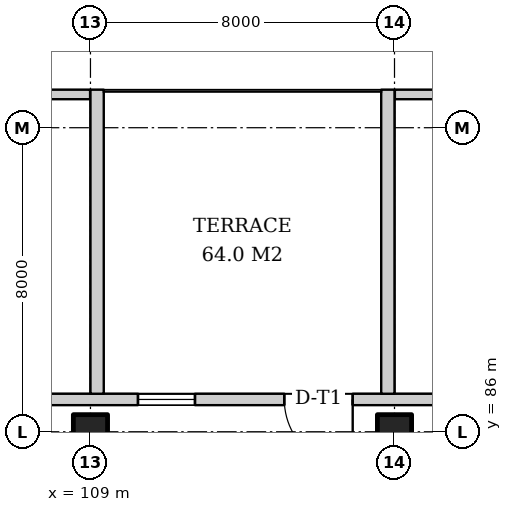
"""IFC4 building model, lengths in metres.
Left out: names, types, materials, properties, quantities, classifications, styles, units other than length and angle.
Written with IfcOpenShell. Run it as: python <this file> out.ifc"""

import sys

from ifc_helpers import new_model, si_unit, direction, frame, frame_2d, origin, origin_2d, place, context, subcontext, project, spatial, rectangle, extrude, element, fill, save


model = new_model("IFC4")
c1 = context("Model", 3, precision=1e-05, world=origin(), true_north=direction((0.0, 1.0)))
c2 = subcontext(c1, "Body", "Model", "MODEL_VIEW")
j1 = project(units=[si_unit("LENGTHUNIT", "METRE"), si_unit("PLANEANGLEUNIT", "RADIAN")], contexts=[c1])
p1 = place(None, origin())
s1 = spatial("IfcSite", under=j1, at=p1, CompositionType="ELEMENT")
p2 = place(p1, origin())
s2 = spatial("IfcBuilding", under=s1, at=p2, CompositionType="ELEMENT")
p3 = place(p2, frame((0.0, 0.0, 6.0)))
s3 = spatial("IfcBuildingStorey", under=s2, at=p3, CompositionType="ELEMENT", Elevation=6.0)
for number, where, z_axis, x_axis in (
    (1, (109.0, 86.0, 0.0), (0.0, 0.0, 1.0), (1.0, 0.0, 0.0)),
    (2, (117.0, 86.0, 0.0), (0.0, 0.0, 1.0), (1.0, 0.0, 0.0)),
):
    element("IfcColumn", number, at=place(p3, frame(where, z_axis=z_axis, x_axis=x_axis)), inside=s3, PredefinedType="COLUMN", context=c2, shape_type="SweptSolid", body=[
        extrude(rectangle(XDim=0.9, YDim=0.9, at=origin_2d()), origin(), (0.0, 0.0, 1.0), 5.0),
    ])
p4 = place(p3, frame((142.0, 86.85, 0.0), z_axis=(0.0, 0.0, 1.0), x_axis=(-1.0, 0.0, 0.0)))
e3 = element("IfcWall", 3, at=p4, inside=s3, PredefinedType="SOLIDWALL", context=c2, shape_type="SweptSolid", body=[
    extrude(rectangle(XDim=50.0, YDim=0.3, at=frame_2d((25.0, 0.0))), origin(), (0.0, 0.0, 1.0), 4.7),
])
p5 = place(p4, frame((1.5, 0.0, 0.9)))
e4 = element("IfcOpeningElement", 4, at=p5, cuts=e3, PredefinedType="OPENING", context=c2, shape_type="SweptSolid", body=[
    extrude(rectangle(XDim=1.5, YDim=3.2, at=frame_2d((0.75, 1.6))), frame((0.0, 0.16, 0.0), z_axis=(0.0, -1.0, 0.0), x_axis=(1.0, 0.0, 0.0)), (0.0, 0.0, 1.0), 0.32),
])
p6 = place(p4, frame((6.0, 0.0, 0.9)))
e5 = element("IfcOpeningElement", 5, at=p6, cuts=e3, PredefinedType="OPENING", context=c2, shape_type="SweptSolid", body=[
    extrude(rectangle(XDim=1.5, YDim=3.2, at=frame_2d((0.75, 1.6))), frame((0.0, 0.16, 0.0), z_axis=(0.0, -1.0, 0.0), x_axis=(1.0, 0.0, 0.0)), (0.0, 0.0, 1.0), 0.32),
])
p7 = place(p4, frame((10.25, 0.0, 0.9)))
e6 = element("IfcOpeningElement", 6, at=p7, cuts=e3, PredefinedType="OPENING", context=c2, shape_type="SweptSolid", body=[
    extrude(rectangle(XDim=1.5, YDim=3.2, at=frame_2d((0.75, 1.6))), frame((0.0, 0.16, 0.0), z_axis=(0.0, -1.0, 0.0), x_axis=(1.0, 0.0, 0.0)), (0.0, 0.0, 1.0), 0.32),
])
p8 = place(p4, frame((14.25, 0.0, 0.9)))
e7 = element("IfcOpeningElement", 7, at=p8, cuts=e3, PredefinedType="OPENING", context=c2, shape_type="SweptSolid", body=[
    extrude(rectangle(XDim=1.5, YDim=3.2, at=frame_2d((0.75, 1.6))), frame((0.0, 0.16, 0.0), z_axis=(0.0, -1.0, 0.0), x_axis=(1.0, 0.0, 0.0)), (0.0, 0.0, 1.0), 0.32),
])
p9 = place(p4, frame((18.25, 0.0, 0.9)))
e8 = element("IfcOpeningElement", 8, at=p9, cuts=e3, PredefinedType="OPENING", context=c2, shape_type="SweptSolid", body=[
    extrude(rectangle(XDim=1.5, YDim=3.2, at=frame_2d((0.75, 1.6))), frame((0.0, 0.16, 0.0), z_axis=(0.0, -1.0, 0.0), x_axis=(1.0, 0.0, 0.0)), (0.0, 0.0, 1.0), 0.32),
])
p10 = place(p4, frame((22.25, 0.0, 0.9)))
e9 = element("IfcOpeningElement", 9, at=p10, cuts=e3, PredefinedType="OPENING", context=c2, shape_type="SweptSolid", body=[
    extrude(rectangle(XDim=1.5, YDim=3.2, at=frame_2d((0.75, 1.6))), frame((0.0, 0.16, 0.0), z_axis=(0.0, -1.0, 0.0), x_axis=(1.0, 0.0, 0.0)), (0.0, 0.0, 1.0), 0.32),
])
p11 = place(p4, frame((26.1, 0.0, 0.0)))
e10 = element("IfcOpeningElement", 10, at=p11, cuts=e3, PredefinedType="OPENING", context=c2, shape_type="SweptSolid", body=[
    extrude(rectangle(XDim=1.8, YDim=2.4, at=frame_2d((0.9, 1.2))), frame((0.0, 0.16, 0.0), z_axis=(0.0, -1.0, 0.0), x_axis=(1.0, 0.0, 0.0)), (0.0, 0.0, 1.0), 0.32),
])
p12 = place(p4, frame((30.25, 0.0, 0.9)))
e11 = element("IfcOpeningElement", 11, at=p12, cuts=e3, PredefinedType="OPENING", context=c2, shape_type="SweptSolid", body=[
    extrude(rectangle(XDim=1.5, YDim=3.2, at=frame_2d((0.75, 1.6))), frame((0.0, 0.16, 0.0), z_axis=(0.0, -1.0, 0.0), x_axis=(1.0, 0.0, 0.0)), (0.0, 0.0, 1.0), 0.32),
])
p13 = place(p4, frame((34.25, 0.0, 0.9)))
e12 = element("IfcOpeningElement", 12, at=p13, cuts=e3, PredefinedType="OPENING", context=c2, shape_type="SweptSolid", body=[
    extrude(rectangle(XDim=1.5, YDim=3.2, at=frame_2d((0.75, 1.6))), frame((0.0, 0.16, 0.0), z_axis=(0.0, -1.0, 0.0), x_axis=(1.0, 0.0, 0.0)), (0.0, 0.0, 1.0), 0.32),
])
p14 = place(p4, frame((38.25, 0.0, 0.9)))
e13 = element("IfcOpeningElement", 13, at=p14, cuts=e3, PredefinedType="OPENING", context=c2, shape_type="SweptSolid", body=[
    extrude(rectangle(XDim=1.5, YDim=3.2, at=frame_2d((0.75, 1.6))), frame((0.0, 0.16, 0.0), z_axis=(0.0, -1.0, 0.0), x_axis=(1.0, 0.0, 0.0)), (0.0, 0.0, 1.0), 0.32),
])
p15 = place(p4, frame((42.5, 0.0, 0.9)))
e14 = element("IfcOpeningElement", 14, at=p15, cuts=e3, PredefinedType="OPENING", context=c2, shape_type="SweptSolid", body=[
    extrude(rectangle(XDim=1.5, YDim=3.2, at=frame_2d((0.75, 1.6))), frame((0.0, 0.16, 0.0), z_axis=(0.0, -1.0, 0.0), x_axis=(1.0, 0.0, 0.0)), (0.0, 0.0, 1.0), 0.32),
])
p16 = place(p4, frame((47.0, 0.0, 0.9)))
e15 = element("IfcOpeningElement", 15, at=p16, cuts=e3, PredefinedType="OPENING", context=c2, shape_type="SweptSolid", body=[
    extrude(rectangle(XDim=1.5, YDim=3.2, at=frame_2d((0.75, 1.6))), frame((0.0, 0.16, 0.0), z_axis=(0.0, -1.0, 0.0), x_axis=(1.0, 0.0, 0.0)), (0.0, 0.0, 1.0), 0.32),
])
p17 = place(p3, frame((92.0, 94.875, 0.0), z_axis=(0.0, 0.0, 1.0), x_axis=(1.0, 0.0, 0.0)))
e16 = element("IfcWall", 16, at=p17, inside=s3, PredefinedType="PARAPET", context=c2, shape_type="SweptSolid", body=[
    extrude(rectangle(XDim=16.99, YDim=0.25, at=frame_2d((8.495, 0.0))), origin(), (0.0, 0.0, 1.0), 1.1),
])
p18 = place(p3, frame((117.01, 94.875, 0.0), z_axis=(0.0, 0.0, 1.0), x_axis=(1.0, 0.0, 0.0)))
e17 = element("IfcWall", 17, at=p18, inside=s3, PredefinedType="PARAPET", context=c2, shape_type="SweptSolid", body=[
    extrude(rectangle(XDim=24.99, YDim=0.25, at=frame_2d((12.495, 0.0))), origin(), (0.0, 0.0, 1.0), 1.1),
])
for number, where, z_axis, x_axis in (
    (18, (109.175, 87.0, 0.0), (0.0, 0.0, 1.0), (0.0, 1.0, 0.0)),
    (19, (116.825, 87.0, 0.0), (0.0, 0.0, 1.0), (0.0, 1.0, 0.0)),
):
    element("IfcWall", number, at=place(p3, frame(where, z_axis=z_axis, x_axis=x_axis)), inside=s3, PredefinedType="PARAPET", context=c2, shape_type="SweptSolid", body=[
        extrude(rectangle(XDim=8.0, YDim=0.35, at=frame_2d((4.0, 0.0))), origin(), (0.0, 0.0, 1.0), 1.1),
    ])
p19 = place(p11, origin())
e20 = element("IfcDoor", 20, at=p19, inside=s3, OperationType="DOUBLE_DOOR_SINGLE_SWING", PredefinedType="DOOR", context=c2, shape_type="SweptSolid", body=[
    extrude(rectangle(XDim=1.8, YDim=2.4, at=frame_2d((0.9, 1.2))), frame((0.0, 0.025, 0.0), z_axis=(0.0, -1.0, 0.0), x_axis=(1.0, 0.0, 0.0)), (0.0, 0.0, 1.0), 0.05),
])
fill(e10, e20)
p20 = place(p12, origin())
e21 = element("IfcWindow", 21, at=p20, inside=s3, PartitioningType="SINGLE_PANEL", PredefinedType="WINDOW", context=c2, shape_type="SweptSolid", body=[
    extrude(rectangle(XDim=1.5, YDim=3.2, at=frame_2d((0.75, 1.6))), frame((0.0, 0.03, 0.0), z_axis=(0.0, -1.0, 0.0), x_axis=(1.0, 0.0, 0.0)), (0.0, 0.0, 1.0), 0.06),
])
fill(e11, e21)
save(model, sys.argv[1])
